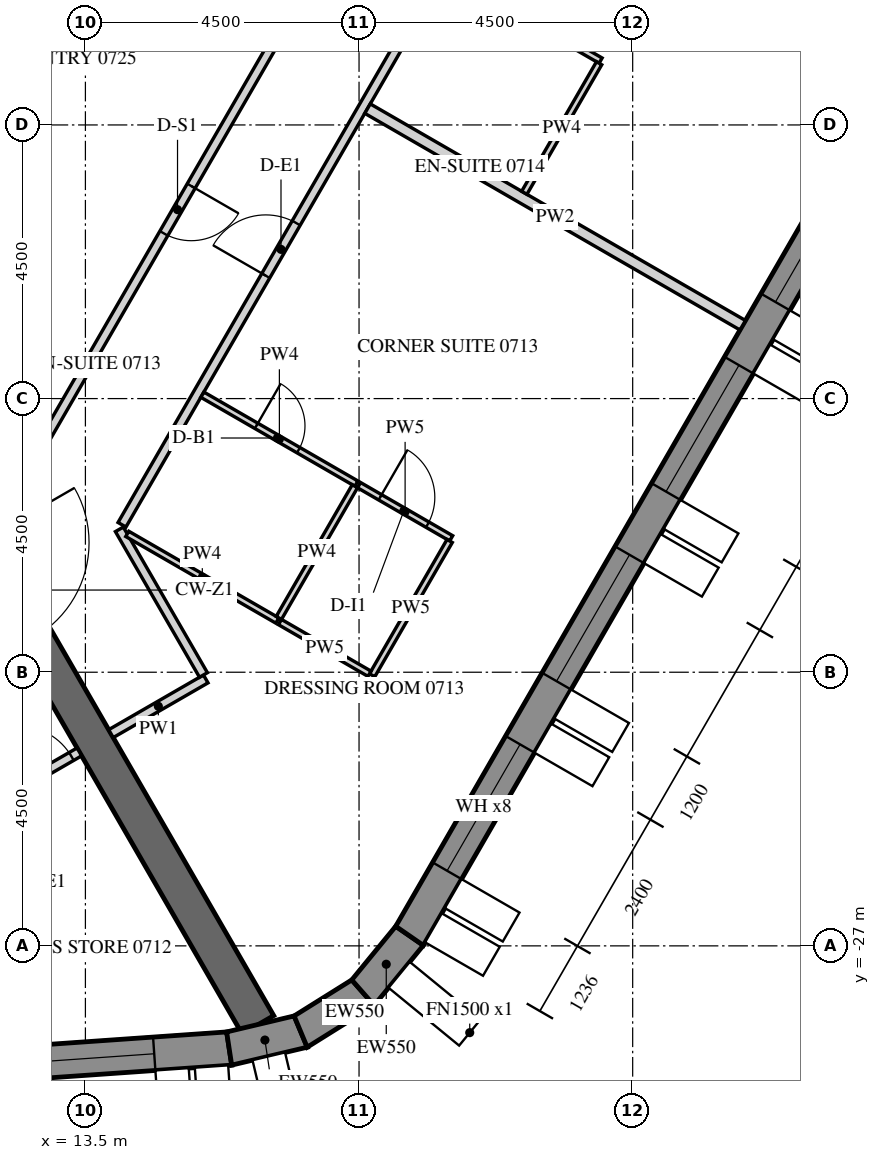
"""IFC4 building model, lengths in metres.
Left out: names, types, materials, properties, quantities, classifications, styles, units other than length and angle.
Written with IfcOpenShell. Run it as: python <this file> out.ifc"""

import sys

from ifc_helpers import new_model, si_unit, direction, frame, frame_2d, origin, place, context, subcontext, project, spatial, polyline, rectangle, outline, extrude, element, fill, save


model = new_model("IFC4")
c1 = context("Model", 3, precision=1e-05, world=origin(), true_north=direction((0.0, 1.0)))
c2 = subcontext(c1, "Body", "Model", "MODEL_VIEW")
j1 = project(units=[si_unit("LENGTHUNIT", "METRE"), si_unit("PLANEANGLEUNIT", "RADIAN")], contexts=[c1])
p1 = place(None, origin())
s1 = spatial("IfcSite", under=j1, at=p1, CompositionType="ELEMENT")
p2 = place(p1, origin())
s2 = spatial("IfcBuilding", under=s1, at=p2, CompositionType="ELEMENT")
p3 = place(p2, frame((0.0, 0.0, 99.9)))
s3 = spatial("IfcBuildingStorey", under=s2, at=p3, CompositionType="ELEMENT", Elevation=99.9)
p4 = place(p3, frame((-14.134, -30.786, -0.15), z_axis=(0.0, 0.0, 1.0), x_axis=(0.997564037441, 0.069756657061, 0.0)))
e1 = element("IfcWall", 1, at=p4, inside=s3, PredefinedType="SOLIDWALL", context=c2, shape_type="SweptSolid", body=[
    extrude(outline(polyline([(-0.026, -0.275), (30.094, -0.275), (30.049, 0.275), (0.026, 0.275), (-0.026, -0.275)])), origin(), (0.0, 0.0, 1.0), 3.9),
])
p5 = place(p4, frame((1.236, 0.0, 1.05)))
e2 = element("IfcOpeningElement", 2, at=p5, cuts=e1, PredefinedType="OPENING", context=c2, shape_type="SweptSolid", body=[
    extrude(rectangle(XDim=2.4, YDim=2.4, at=frame_2d((1.2, 1.2))), frame((0.0, 0.285, 0.0), z_axis=(0.0, -1.0, 0.0), x_axis=(1.0, 0.0, 0.0)), (0.0, 0.0, 1.0), 0.57),
])
p6 = place(p4, frame((4.835, 0.0, 1.05)))
e3 = element("IfcOpeningElement", 3, at=p6, cuts=e1, PredefinedType="OPENING", context=c2, shape_type="SweptSolid", body=[
    extrude(rectangle(XDim=2.4, YDim=2.4, at=frame_2d((1.2, 1.2))), frame((0.0, 0.285, 0.0), z_axis=(0.0, -1.0, 0.0), x_axis=(1.0, 0.0, 0.0)), (0.0, 0.0, 1.0), 0.57),
])
p7 = place(p4, frame((8.436, 0.0, 1.05)))
e4 = element("IfcOpeningElement", 4, at=p7, cuts=e1, PredefinedType="OPENING", context=c2, shape_type="SweptSolid", body=[
    extrude(rectangle(XDim=2.4, YDim=2.4, at=frame_2d((1.2, 1.2))), frame((0.0, 0.285, 0.0), z_axis=(0.0, -1.0, 0.0), x_axis=(1.0, 0.0, 0.0)), (0.0, 0.0, 1.0), 0.57),
])
p8 = place(p4, frame((12.035, 0.0, 1.05)))
e5 = element("IfcOpeningElement", 5, at=p8, cuts=e1, PredefinedType="OPENING", context=c2, shape_type="SweptSolid", body=[
    extrude(rectangle(XDim=2.4, YDim=2.4, at=frame_2d((1.2, 1.2))), frame((0.0, 0.285, 0.0), z_axis=(0.0, -1.0, 0.0), x_axis=(1.0, 0.0, 0.0)), (0.0, 0.0, 1.0), 0.57),
])
p9 = place(p4, frame((15.635, 0.0, 1.05)))
e6 = element("IfcOpeningElement", 6, at=p9, cuts=e1, PredefinedType="OPENING", context=c2, shape_type="SweptSolid", body=[
    extrude(rectangle(XDim=2.4, YDim=2.4, at=frame_2d((1.2, 1.2))), frame((0.0, 0.285, 0.0), z_axis=(0.0, -1.0, 0.0), x_axis=(1.0, 0.0, 0.0)), (0.0, 0.0, 1.0), 0.57),
])
p10 = place(p4, frame((19.236, 0.0, 1.05)))
e7 = element("IfcOpeningElement", 7, at=p10, cuts=e1, PredefinedType="OPENING", context=c2, shape_type="SweptSolid", body=[
    extrude(rectangle(XDim=2.4, YDim=2.4, at=frame_2d((1.2, 1.2))), frame((0.0, 0.285, 0.0), z_axis=(0.0, -1.0, 0.0), x_axis=(1.0, 0.0, 0.0)), (0.0, 0.0, 1.0), 0.57),
])
p11 = place(p4, frame((22.835, 0.0, 1.05)))
e8 = element("IfcOpeningElement", 8, at=p11, cuts=e1, PredefinedType="OPENING", context=c2, shape_type="SweptSolid", body=[
    extrude(rectangle(XDim=2.4, YDim=2.4, at=frame_2d((1.2, 1.2))), frame((0.0, 0.285, 0.0), z_axis=(0.0, -1.0, 0.0), x_axis=(1.0, 0.0, 0.0)), (0.0, 0.0, 1.0), 0.57),
])
p12 = place(p4, frame((26.436, 0.0, 1.05)))
e9 = element("IfcOpeningElement", 9, at=p12, cuts=e1, PredefinedType="OPENING", context=c2, shape_type="SweptSolid", body=[
    extrude(rectangle(XDim=2.4, YDim=2.4, at=frame_2d((1.2, 1.2))), frame((0.0, 0.285, 0.0), z_axis=(0.0, -1.0, 0.0), x_axis=(1.0, 0.0, 0.0)), (0.0, 0.0, 1.0), 0.57),
])
p13 = place(p3, frame((15.864, -28.688, -0.15), z_axis=(0.0, 0.0, 1.0), x_axis=(0.973063591128, 0.230536868247, 0.0)))
e10 = element("IfcWall", 10, at=p13, inside=s3, PredefinedType="SOLIDWALL", context=c2, shape_type="SweptSolid", body=[
    extrude(outline(polyline([(-0.022, -0.275), (1.253, -0.275), (1.163, 0.275), (0.022, 0.275), (-0.022, -0.275)])), origin(), (0.0, 0.0, 1.0), 3.9),
])
p14 = place(p3, frame((17.04, -28.41, -0.15), z_axis=(0.0, 0.0, 1.0), x_axis=(0.847952888306, 0.530071598195, 0.0)))
e11 = element("IfcWall", 11, at=p14, inside=s3, PredefinedType="SOLIDWALL", context=c2, shape_type="SweptSolid", body=[
    extrude(outline(polyline([(-0.045, -0.275), (1.253, -0.275), (1.163, 0.275), (0.045, 0.275), (-0.045, -0.275)])), origin(), (0.0, 0.0, 1.0), 3.9),
])
p15 = place(p3, frame((18.064, -27.769, -0.15), z_axis=(0.0, 0.0, 1.0), x_axis=(0.633842757806, 0.773461930787, 0.0)))
e12 = element("IfcWall", 12, at=p15, inside=s3, PredefinedType="SOLIDWALL", context=c2, shape_type="SweptSolid", body=[
    extrude(outline(polyline([(-0.045, -0.275), (1.231, -0.275), (1.186, 0.275), (0.045, 0.275), (-0.045, -0.275)])), origin(), (0.0, 0.0, 1.0), 3.9),
])
p16 = place(p3, frame((18.83, -26.835, -0.15), z_axis=(0.0, 0.0, 1.0), x_axis=(0.500003800416, 0.866023209602, 0.0)))
e13 = element("IfcWall", 13, at=p16, inside=s3, PredefinedType="SOLIDWALL", context=c2, shape_type="SweptSolid", body=[
    extrude(outline(polyline([(-0.022, -0.275), (30.097, -0.275), (30.045, 0.275), (0.022, 0.275), (-0.022, -0.275)])), origin(), (0.0, 0.0, 1.0), 3.9),
])
p17 = place(p16, frame((1.236, 0.0, 1.05)))
e14 = element("IfcOpeningElement", 14, at=p17, cuts=e13, PredefinedType="OPENING", context=c2, shape_type="SweptSolid", body=[
    extrude(rectangle(XDim=2.4, YDim=2.4, at=frame_2d((1.2, 1.2))), frame((0.0, 0.285, 0.0), z_axis=(0.0, -1.0, 0.0), x_axis=(1.0, 0.0, 0.0)), (0.0, 0.0, 1.0), 0.57),
])
p18 = place(p16, frame((4.835, 0.0, 1.05)))
e15 = element("IfcOpeningElement", 15, at=p18, cuts=e13, PredefinedType="OPENING", context=c2, shape_type="SweptSolid", body=[
    extrude(rectangle(XDim=2.4, YDim=2.4, at=frame_2d((1.2, 1.2))), frame((0.0, 0.285, 0.0), z_axis=(0.0, -1.0, 0.0), x_axis=(1.0, 0.0, 0.0)), (0.0, 0.0, 1.0), 0.57),
])
p19 = place(p16, frame((8.436, 0.0, 1.05)))
e16 = element("IfcOpeningElement", 16, at=p19, cuts=e13, PredefinedType="OPENING", context=c2, shape_type="SweptSolid", body=[
    extrude(rectangle(XDim=2.4, YDim=2.4, at=frame_2d((1.2, 1.2))), frame((0.0, 0.285, 0.0), z_axis=(0.0, -1.0, 0.0), x_axis=(1.0, 0.0, 0.0)), (0.0, 0.0, 1.0), 0.57),
])
p20 = place(p16, frame((12.035, 0.0, 1.05)))
e17 = element("IfcOpeningElement", 17, at=p20, cuts=e13, PredefinedType="OPENING", context=c2, shape_type="SweptSolid", body=[
    extrude(rectangle(XDim=2.4, YDim=2.4, at=frame_2d((1.2, 1.2))), frame((0.0, 0.285, 0.0), z_axis=(0.0, -1.0, 0.0), x_axis=(1.0, 0.0, 0.0)), (0.0, 0.0, 1.0), 0.57),
])
p21 = place(p16, frame((15.635, 0.0, 1.05)))
e18 = element("IfcOpeningElement", 18, at=p21, cuts=e13, PredefinedType="OPENING", context=c2, shape_type="SweptSolid", body=[
    extrude(rectangle(XDim=2.4, YDim=2.4, at=frame_2d((1.2, 1.2))), frame((0.0, 0.285, 0.0), z_axis=(0.0, -1.0, 0.0), x_axis=(1.0, 0.0, 0.0)), (0.0, 0.0, 1.0), 0.57),
])
p22 = place(p16, frame((19.236, 0.0, 1.05)))
e19 = element("IfcOpeningElement", 19, at=p22, cuts=e13, PredefinedType="OPENING", context=c2, shape_type="SweptSolid", body=[
    extrude(rectangle(XDim=2.4, YDim=2.4, at=frame_2d((1.2, 1.2))), frame((0.0, 0.285, 0.0), z_axis=(0.0, -1.0, 0.0), x_axis=(1.0, 0.0, 0.0)), (0.0, 0.0, 1.0), 0.57),
])
p23 = place(p16, frame((22.835, 0.0, 1.05)))
e20 = element("IfcOpeningElement", 20, at=p23, cuts=e13, PredefinedType="OPENING", context=c2, shape_type="SweptSolid", body=[
    extrude(rectangle(XDim=2.4, YDim=2.4, at=frame_2d((1.2, 1.2))), frame((0.0, 0.285, 0.0), z_axis=(0.0, -1.0, 0.0), x_axis=(1.0, 0.0, 0.0)), (0.0, 0.0, 1.0), 0.57),
])
p24 = place(p16, frame((26.436, 0.0, 1.05)))
e21 = element("IfcOpeningElement", 21, at=p24, cuts=e13, PredefinedType="OPENING", context=c2, shape_type="SweptSolid", body=[
    extrude(rectangle(XDim=2.4, YDim=2.4, at=frame_2d((1.2, 1.2))), frame((0.0, 0.285, 0.0), z_axis=(0.0, -1.0, 0.0), x_axis=(1.0, 0.0, 0.0)), (0.0, 0.0, 1.0), 0.57),
])
p25 = place(p3, frame((7.91, -13.7, -0.15), z_axis=(0.0, 0.0, 1.0), x_axis=(0.499999880136, 0.866025472988, 0.0)))
e22 = element("IfcWall", 22, at=p25, inside=s3, PredefinedType="SHEAR", context=c2, shape_type="SweptSolid", body=[
    extrude(outline(polyline([(-0.173, -0.3), (15.993, -0.3), (15.646, 0.3), (0.173, 0.3), (-0.173, -0.3)])), origin(), (0.0, 0.0, 1.0), 3.9),
])
p26 = place(p25, frame((7.039, 0.0, 0.15)))
e23 = element("IfcOpeningElement", 23, at=p26, cuts=e22, PredefinedType="OPENING", context=c2, shape_type="SweptSolid", body=[
    extrude(rectangle(XDim=1.8, YDim=2.4, at=frame_2d((0.9, 1.2))), frame((0.0, 0.31, 0.0), z_axis=(0.0, -1.0, 0.0), x_axis=(1.0, 0.0, 0.0)), (0.0, 0.0, 1.0), 0.62),
])
p27 = place(p3, frame((8.083, -14.0, -0.15), z_axis=(0.0, 0.0, 1.0), x_axis=(0.499997680643, -0.866026742862, 0.0)))
e24 = element("IfcWall", 24, at=p27, inside=s3, PredefinedType="SHEAR", context=c2, shape_type="SweptSolid", body=[
    extrude(rectangle(XDim=16.509, YDim=0.6, at=frame_2d((8.254, 0.0))), origin(), (0.0, 0.0, 1.0), 3.9),
])
p28 = place(p27, frame((7.354, 0.0, 0.15)))
e25 = element("IfcOpeningElement", 25, at=p28, cuts=e24, PredefinedType="OPENING", context=c2, shape_type="SweptSolid", body=[
    extrude(rectangle(XDim=1.8, YDim=2.4, at=frame_2d((0.9, 1.2))), frame((0.0, 0.31, 0.0), z_axis=(0.0, -1.0, 0.0), x_axis=(1.0, 0.0, 0.0)), (0.0, 0.0, 1.0), 0.62),
])
p29 = place(p3, frame((11.906, -24.673, 0.0), z_axis=(0.0, 0.0, 1.0), x_axis=(0.866013532718, 0.500020560727, 0.0)))
e26 = element("IfcWall", 26, at=p29, inside=s3, PredefinedType="PARTITIONING", context=c2, shape_type="SweptSolid", body=[
    extrude(rectangle(XDim=1.725, YDim=0.15, at=frame_2d((0.863, 0.0))), origin(), (0.0, 0.0, 1.0), 2.988),
])
p30 = place(p29, frame((0.575, 0.0, 0.0)))
e27 = element("IfcOpeningElement", 27, at=p30, cuts=e26, PredefinedType="OPENING", context=c2, shape_type="SweptSolid", body=[
    extrude(rectangle(XDim=1.0, YDim=2.1, at=frame_2d((0.5, 1.05))), frame((0.0, 0.085, 0.0), z_axis=(0.0, -1.0, 0.0), x_axis=(1.0, 0.0, 0.0)), (0.0, 0.0, 1.0), 0.17),
])
p31 = place(p3, frame((13.92, -23.51, 0.0), z_axis=(0.0, 0.0, 1.0), x_axis=(0.866047807691, 0.499961193289, 0.0)))
e28 = element("IfcWall", 28, at=p31, inside=s3, PredefinedType="PARTITIONING", context=c2, shape_type="SweptSolid", body=[
    extrude(rectangle(XDim=1.8, YDim=0.15, at=frame_2d((0.9, 0.0))), origin(), (0.0, 0.0, 1.0), 2.988),
])
p32 = place(p3, frame((15.441, -22.545, 0.0), z_axis=(0.0, 0.0, 1.0), x_axis=(-0.499974611044, 0.866040061609, 0.0)))
e29 = element("IfcWall", 29, at=p32, inside=s3, PredefinedType="PARTITIONING", context=c2, shape_type="SweptSolid", body=[
    extrude(rectangle(XDim=2.766, YDim=0.15, at=frame_2d((1.383, 0.0))), origin(), (0.0, 0.0, 1.0), 2.988),
])
p33 = place(p3, frame((14.102, -20.075, 0.0), z_axis=(0.0, 0.0, 1.0), x_axis=(0.499996816197, 0.866027241946, 0.0)))
e30 = element("IfcWall", 30, at=p33, inside=s3, PredefinedType="PARTITIONING", context=c2, shape_type="SweptSolid", body=[
    extrude(rectangle(XDim=24.238, YDim=0.15, at=frame_2d((12.119, 0.0))), origin(), (0.0, 0.0, 1.0), 2.988),
])
p34 = place(p33, frame((4.729, 0.0, 0.0)))
e31 = element("IfcOpeningElement", 31, at=p34, cuts=e30, PredefinedType="OPENING", context=c2, shape_type="SweptSolid", body=[
    extrude(rectangle(XDim=1.0, YDim=2.1, at=frame_2d((0.5, 1.05))), frame((0.0, 0.085, 0.0), z_axis=(0.0, -1.0, 0.0), x_axis=(1.0, 0.0, 0.0)), (0.0, 0.0, 1.0), 0.17),
])
p35 = place(p33, frame((15.946, 0.0, 0.0)))
e32 = element("IfcOpeningElement", 32, at=p35, cuts=e30, PredefinedType="OPENING", context=c2, shape_type="SweptSolid", body=[
    extrude(rectangle(XDim=1.0, YDim=2.1, at=frame_2d((0.5, 1.05))), frame((0.0, 0.085, 0.0), z_axis=(0.0, -1.0, 0.0), x_axis=(1.0, 0.0, 0.0)), (0.0, 0.0, 1.0), 0.17),
])
p36 = place(p3, frame((17.162, -11.174, 0.0), z_axis=(0.0, 0.0, 1.0), x_axis=(-0.499997214665, -0.866027011893, 0.0)))
e33 = element("IfcWall", 33, at=p36, inside=s3, PredefinedType="PARTITIONING", context=c2, shape_type="SweptSolid", body=[
    extrude(rectangle(XDim=8.589, YDim=0.15, at=frame_2d((4.294, 0.0))), origin(), (0.0, 0.0, 1.0), 2.988),
])
p37 = place(p36, frame((3.844, 0.0, 0.0)))
e34 = element("IfcOpeningElement", 34, at=p37, cuts=e33, PredefinedType="OPENING", context=c2, shape_type="SweptSolid", body=[
    extrude(rectangle(XDim=0.9, YDim=2.1, at=frame_2d((0.45, 1.05))), frame((0.0, 0.085, 0.0), z_axis=(0.0, -1.0, 0.0), x_axis=(1.0, 0.0, 0.0)), (0.0, 0.0, 1.0), 0.17),
])
p38 = place(p3, frame((16.656, -21.65, 0.0), z_axis=(0.0, 0.0, 1.0), x_axis=(-0.866041498374, 0.499972122318, 0.0)))
e35 = element("IfcWall", 35, at=p38, inside=s3, PredefinedType="PARTITIONING", context=c2, shape_type="SweptSolid", body=[
    extrude(rectangle(XDim=2.85, YDim=0.1, at=frame_2d((1.425, 0.0))), origin(), (0.0, 0.0, 1.0), 2.988),
])
p39 = place(p3, frame((15.423, -17.936, 0.0), z_axis=(0.0, 0.0, 1.0), x_axis=(0.86601045545, -0.500025890382, 0.0)))
e36 = element("IfcWall", 36, at=p39, inside=s3, PredefinedType="PARTITIONING", context=c2, shape_type="SweptSolid", body=[
    extrude(rectangle(XDim=2.925, YDim=0.1, at=frame_2d((1.462, 0.0))), origin(), (0.0, 0.0, 1.0), 2.988),
])
p40 = place(p39, frame((1.025, 0.0, 0.0)))
e37 = element("IfcOpeningElement", 37, at=p40, cuts=e36, PredefinedType="OPENING", context=c2, shape_type="SweptSolid", body=[
    extrude(rectangle(XDim=0.8, YDim=2.1, at=frame_2d((0.4, 1.05))), frame((0.0, 0.06, 0.0), z_axis=(0.0, -1.0, 0.0), x_axis=(1.0, 0.0, 0.0)), (0.0, 0.0, 1.0), 0.12),
])
p41 = place(p3, frame((18.0, -19.423, 0.0), z_axis=(0.0, 0.0, 1.0), x_axis=(0.866036909293, -0.499980071345, 0.0)))
e38 = element("IfcWall", 38, at=p41, inside=s3, PredefinedType="PARTITIONING", context=c2, shape_type="SweptSolid", body=[
    extrude(rectangle(XDim=1.75, YDim=0.1, at=frame_2d((0.875, 0.0))), origin(), (0.0, 0.0, 1.0), 2.988),
])
p42 = place(p41, frame((0.4, 0.0, 0.0)))
e39 = element("IfcOpeningElement", 39, at=p42, cuts=e38, PredefinedType="OPENING", context=c2, shape_type="SweptSolid", body=[
    extrude(rectangle(XDim=0.9, YDim=2.1, at=frame_2d((0.45, 1.05))), frame((0.0, 0.06, 0.0), z_axis=(0.0, -1.0, 0.0), x_axis=(1.0, 0.0, 0.0)), (0.0, 0.0, 1.0), 0.12),
])
p43 = place(p3, frame((19.49, -20.342, 0.0), z_axis=(0.0, 0.0, 1.0), x_axis=(-0.500020783669, -0.866013403995, 0.0)))
e40 = element("IfcWall", 40, at=p43, inside=s3, PredefinedType="PARTITIONING", context=c2, shape_type="SweptSolid", body=[
    extrude(rectangle(XDim=2.55, YDim=0.1, at=frame_2d((1.275, 0.0))), origin(), (0.0, 0.0, 1.0), 2.988),
])
p44 = place(p3, frame((18.172, -22.525, 0.0), z_axis=(0.0, 0.0, 1.0), x_axis=(-0.86605165483, 0.499954529098, 0.0)))
e41 = element("IfcWall", 41, at=p44, inside=s3, PredefinedType="PARTITIONING", context=c2, shape_type="SweptSolid", body=[
    extrude(rectangle(XDim=1.7, YDim=0.1, at=frame_2d((0.85, 0.0))), origin(), (0.0, 0.0, 1.0), 2.988),
])
p45 = place(p3, frame((24.31, -16.794, 0.0), z_axis=(0.0, 0.0, 1.0), x_axis=(-0.866024672353, 0.500001266874, 0.0)))
e42 = element("IfcWall", 42, at=p45, inside=s3, PredefinedType="PARTITIONING", context=c2, shape_type="SweptSolid", body=[
    extrude(rectangle(XDim=7.125, YDim=0.18, at=frame_2d((3.562, 0.0))), origin(), (0.0, 0.0, 1.0), 2.988),
])
p46 = place(p3, frame((16.682, -21.607, 0.0), z_axis=(0.0, 0.0, 1.0), x_axis=(0.500004234368, 0.866022959057, 0.0)))
e43 = element("IfcWall", 43, at=p46, inside=s3, PredefinedType="PARTITIONING", context=c2, shape_type="SweptSolid", body=[
    extrude(rectangle(XDim=2.5, YDim=0.1, at=frame_2d((1.25, 0.0))), origin(), (0.0, 0.0, 1.0), 2.988),
])
p47 = place(p3, frame((19.439, -10.98, 0.0), z_axis=(0.0, 0.0, 1.0), x_axis=(0.866046596414, -0.499963291492, 0.0)))
e44 = element("IfcWall", 44, at=p47, inside=s3, PredefinedType="PARTITIONING", context=c2, shape_type="SweptSolid", body=[
    extrude(rectangle(XDim=2.925, YDim=0.1, at=frame_2d((1.462, 0.0))), origin(), (0.0, 0.0, 1.0), 2.988),
])
p48 = place(p47, frame((1.025, 0.0, 0.0)))
e45 = element("IfcOpeningElement", 45, at=p48, cuts=e44, PredefinedType="OPENING", context=c2, shape_type="SweptSolid", body=[
    extrude(rectangle(XDim=0.8, YDim=2.1, at=frame_2d((0.4, 1.05))), frame((0.0, 0.06, 0.0), z_axis=(0.0, -1.0, 0.0), x_axis=(1.0, 0.0, 0.0)), (0.0, 0.0, 1.0), 0.12),
])
p49 = place(p3, frame((21.948, -12.486, 0.0), z_axis=(0.0, 0.0, 1.0), x_axis=(-0.500003092839, -0.866023618125, 0.0)))
e46 = element("IfcWall", 46, at=p49, inside=s3, PredefinedType="PARTITIONING", context=c2, shape_type="SweptSolid", body=[
    extrude(rectangle(XDim=2.46, YDim=0.1, at=frame_2d((1.23, 0.0))), origin(), (0.0, 0.0, 1.0), 2.988),
])
p50 = place(p12, frame((0.0, 0.205, 0.0)))
e47 = element("IfcWindow", 47, at=p50, inside=s3, PartitioningType="DOUBLE_PANEL_VERTICAL", PredefinedType="WINDOW", context=c2, shape_type="SweptSolid", body=[
    extrude(rectangle(XDim=2.4, YDim=2.4, at=frame_2d((1.2, 1.2))), frame((0.0, 0.03, 0.0), z_axis=(0.0, -1.0, 0.0), x_axis=(1.0, 0.0, 0.0)), (0.0, 0.0, 1.0), 0.06),
])
fill(e9, e47)
p51 = place(p17, frame((0.0, 0.205, 0.0)))
e48 = element("IfcWindow", 48, at=p51, inside=s3, PartitioningType="DOUBLE_PANEL_VERTICAL", PredefinedType="WINDOW", context=c2, shape_type="SweptSolid", body=[
    extrude(rectangle(XDim=2.4, YDim=2.4, at=frame_2d((1.2, 1.2))), frame((0.0, 0.03, 0.0), z_axis=(0.0, -1.0, 0.0), x_axis=(1.0, 0.0, 0.0)), (0.0, 0.0, 1.0), 0.06),
])
fill(e14, e48)
p52 = place(p18, frame((0.0, 0.205, 0.0)))
e49 = element("IfcWindow", 49, at=p52, inside=s3, PartitioningType="DOUBLE_PANEL_VERTICAL", PredefinedType="WINDOW", context=c2, shape_type="SweptSolid", body=[
    extrude(rectangle(XDim=2.4, YDim=2.4, at=frame_2d((1.2, 1.2))), frame((0.0, 0.03, 0.0), z_axis=(0.0, -1.0, 0.0), x_axis=(1.0, 0.0, 0.0)), (0.0, 0.0, 1.0), 0.06),
])
fill(e15, e49)
p53 = place(p19, frame((0.0, 0.205, 0.0)))
e50 = element("IfcWindow", 50, at=p53, inside=s3, PartitioningType="DOUBLE_PANEL_VERTICAL", PredefinedType="WINDOW", context=c2, shape_type="SweptSolid", body=[
    extrude(rectangle(XDim=2.4, YDim=2.4, at=frame_2d((1.2, 1.2))), frame((0.0, 0.03, 0.0), z_axis=(0.0, -1.0, 0.0), x_axis=(1.0, 0.0, 0.0)), (0.0, 0.0, 1.0), 0.06),
])
fill(e16, e50)
p54 = place(p20, frame((0.0, 0.205, 0.0)))
e51 = element("IfcWindow", 51, at=p54, inside=s3, PartitioningType="DOUBLE_PANEL_VERTICAL", PredefinedType="WINDOW", context=c2, shape_type="SweptSolid", body=[
    extrude(rectangle(XDim=2.4, YDim=2.4, at=frame_2d((1.2, 1.2))), frame((0.0, 0.03, 0.0), z_axis=(0.0, -1.0, 0.0), x_axis=(1.0, 0.0, 0.0)), (0.0, 0.0, 1.0), 0.06),
])
fill(e17, e51)
p55 = place(p30, origin())
e52 = element("IfcDoor", 52, at=p55, inside=s3, OperationType="SINGLE_SWING_LEFT", PredefinedType="DOOR", context=c2, shape_type="SweptSolid", body=[
    extrude(rectangle(XDim=1.0, YDim=2.1, at=frame_2d((0.5, 1.05))), frame((0.0, 0.025, 0.0), z_axis=(0.0, -1.0, 0.0), x_axis=(1.0, 0.0, 0.0)), (0.0, 0.0, 1.0), 0.05),
])
fill(e27, e52)
p56 = place(p34, origin())
e53 = element("IfcDoor", 53, at=p56, inside=s3, OperationType="SINGLE_SWING_LEFT", PredefinedType="DOOR", context=c2, shape_type="SweptSolid", body=[
    extrude(rectangle(XDim=1.0, YDim=2.1, at=frame_2d((0.5, 1.05))), frame((0.0, 0.025, 0.0), z_axis=(0.0, -1.0, 0.0), x_axis=(1.0, 0.0, 0.0)), (0.0, 0.0, 1.0), 0.05),
])
fill(e31, e53)
p57 = place(p40, origin())
e54 = element("IfcDoor", 54, at=p57, inside=s3, OperationType="SINGLE_SWING_RIGHT", PredefinedType="DOOR", context=c2, shape_type="SweptSolid", body=[
    extrude(rectangle(XDim=0.8, YDim=2.1, at=frame_2d((0.4, 1.05))), frame((0.0, 0.025, 0.0), z_axis=(0.0, -1.0, 0.0), x_axis=(1.0, 0.0, 0.0)), (0.0, 0.0, 1.0), 0.05),
])
fill(e37, e54)
p58 = place(p42, origin())
e55 = element("IfcDoor", 55, at=p58, inside=s3, OperationType="SINGLE_SWING_RIGHT", PredefinedType="DOOR", context=c2, shape_type="SweptSolid", body=[
    extrude(rectangle(XDim=0.9, YDim=2.1, at=frame_2d((0.45, 1.05))), frame((0.0, 0.025, 0.0), z_axis=(0.0, -1.0, 0.0), x_axis=(1.0, 0.0, 0.0)), (0.0, 0.0, 1.0), 0.05),
])
fill(e39, e55)
p59 = place(p37, origin())
e56 = element("IfcDoor", 56, at=p59, inside=s3, OperationType="SINGLE_SWING_LEFT", PredefinedType="DOOR", context=c2, shape_type="SweptSolid", body=[
    extrude(rectangle(XDim=0.9, YDim=2.1, at=frame_2d((0.45, 1.05))), frame((0.0, 0.025, 0.0), z_axis=(0.0, -1.0, 0.0), x_axis=(1.0, 0.0, 0.0)), (0.0, 0.0, 1.0), 0.05),
])
fill(e34, e56)
save(model, sys.argv[1])
